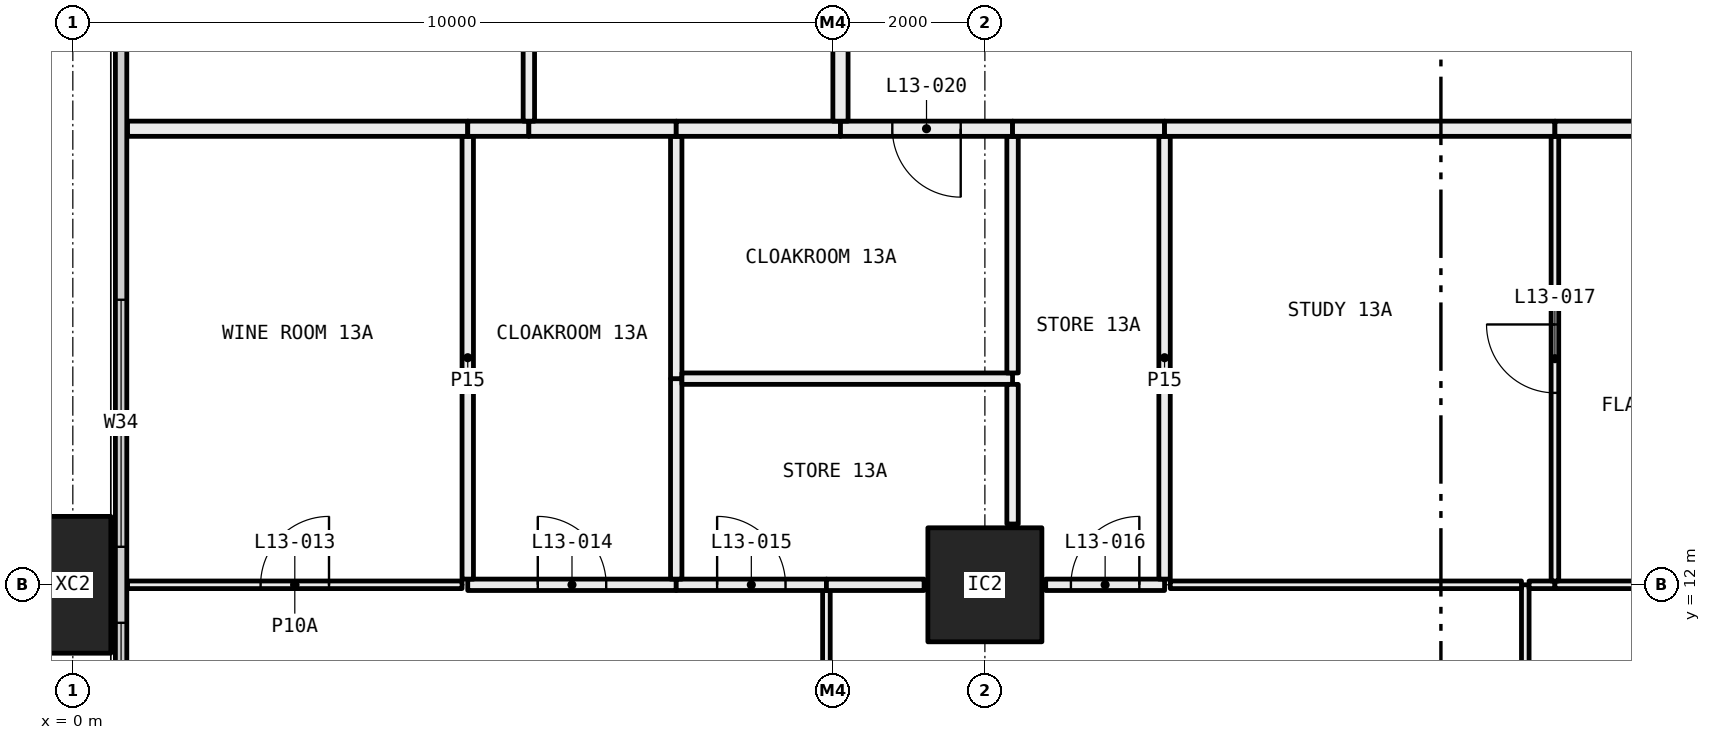
"""IFC4 building model, lengths in metres.
Left out: names, types, materials, properties, quantities, classifications, styles, units other than length and angle.
Written with IfcOpenShell. Run it as: python <this file> out.ifc"""

import sys

from ifc_helpers import new_model, si_unit, direction, frame, frame_2d, origin, origin_2d, place, context, subcontext, project, spatial, rectangle, hollow_rectangle, extrude, element, fill, save


model = new_model("IFC4")
c1 = context("Model", 3, precision=1e-05, world=origin(), true_north=direction((0.0, 1.0)))
c2 = subcontext(c1, "Body", "Model", "MODEL_VIEW")
j1 = project(units=[si_unit("LENGTHUNIT", "METRE"), si_unit("PLANEANGLEUNIT", "RADIAN")], contexts=[c1])
p1 = place(None, origin())
s1 = spatial("IfcSite", under=j1, at=p1, CompositionType="ELEMENT")
p2 = place(p1, origin())
s2 = spatial("IfcBuilding", under=s1, at=p2, CompositionType="ELEMENT")
p3 = place(p2, frame((0.0, 0.0, 57.6)))
s3 = spatial("IfcBuildingStorey", under=s2, at=p3, CompositionType="ELEMENT", Elevation=57.6)
p4 = place(p3, frame((0.0, 12.0, -0.4), z_axis=(0.0, 0.0, 1.0), x_axis=(0.0, 1.0, 0.0)))
e1 = element("IfcColumn", 1, at=p4, inside=s3, PredefinedType="COLUMN", context=c2, shape_type="SweptSolid", body=[
    extrude(hollow_rectangle(XDim=1.8, YDim=1.0, WallThickness=0.07, at=origin_2d()), origin(), (0.0, 0.0, 1.0), 3.45),
])
p5 = place(p3, frame((12.0, 12.0, 0.0), z_axis=(0.0, 0.0, 1.0), x_axis=(1.0, 0.0, 0.0)))
e2 = element("IfcColumn", 2, at=p5, inside=s3, PredefinedType="COLUMN", context=c2, shape_type="SweptSolid", body=[
    extrude(hollow_rectangle(XDim=1.5, YDim=1.5, WallThickness=0.065, at=origin_2d()), origin(), (0.0, 0.0, 1.0), 3.05),
])
p6 = place(p3, frame((0.635, 6.71, 0.0), z_axis=(0.0, 0.0, 1.0), x_axis=(0.0, 1.0, 0.0)))
e3 = element("IfcWall", 3, at=p6, inside=s3, PredefinedType="ELEMENTEDWALL", context=c2, shape_type="SweptSolid", body=[
    extrude(rectangle(XDim=34.58, YDim=0.15, at=frame_2d((17.29, 0.0))), origin(), (0.0, 0.0, 1.0), 3.05),
])
p7 = place(p6, frame((0.29, 0.0, 0.45)))
e4 = element("IfcOpeningElement", 4, at=p7, cuts=e3, PredefinedType="OPENING", context=c2, shape_type="SweptSolid", body=[
    extrude(rectangle(XDim=4.5, YDim=2.55, at=frame_2d((2.25, 1.275))), frame((0.0, 0.085, 0.0), z_axis=(0.0, -1.0, 0.0), x_axis=(1.0, 0.0, 0.0)), (0.0, 0.0, 1.0), 0.17),
])
p8 = place(p6, frame((5.79, 0.0, 0.45)))
e5 = element("IfcOpeningElement", 5, at=p8, cuts=e3, PredefinedType="OPENING", context=c2, shape_type="SweptSolid", body=[
    extrude(rectangle(XDim=3.25, YDim=2.55, at=frame_2d((1.625, 1.275))), frame((0.0, 0.085, 0.0), z_axis=(0.0, -1.0, 0.0), x_axis=(1.0, 0.0, 0.0)), (0.0, 0.0, 1.0), 0.17),
])
p9 = place(p6, frame((13.54, 0.0, 0.45)))
e6 = element("IfcOpeningElement", 6, at=p9, cuts=e3, PredefinedType="OPENING", context=c2, shape_type="SweptSolid", body=[
    extrude(rectangle(XDim=3.25, YDim=2.55, at=frame_2d((1.625, 1.275))), frame((0.0, 0.085, 0.0), z_axis=(0.0, -1.0, 0.0), x_axis=(1.0, 0.0, 0.0)), (0.0, 0.0, 1.0), 0.17),
])
p10 = place(p6, frame((17.79, 0.0, 0.45)))
e7 = element("IfcOpeningElement", 7, at=p10, cuts=e3, PredefinedType="OPENING", context=c2, shape_type="SweptSolid", body=[
    extrude(rectangle(XDim=3.25, YDim=2.55, at=frame_2d((1.625, 1.275))), frame((0.0, 0.085, 0.0), z_axis=(0.0, -1.0, 0.0), x_axis=(1.0, 0.0, 0.0)), (0.0, 0.0, 1.0), 0.17),
])
p11 = place(p6, frame((26.79, 0.0, 0.45)))
e8 = element("IfcOpeningElement", 8, at=p11, cuts=e3, PredefinedType="OPENING", context=c2, shape_type="SweptSolid", body=[
    extrude(rectangle(XDim=2.0, YDim=2.55, at=frame_2d((1.0, 1.275))), frame((0.0, 0.085, 0.0), z_axis=(0.0, -1.0, 0.0), x_axis=(1.0, 0.0, 0.0)), (0.0, 0.0, 1.0), 0.17),
])
p12 = place(p6, frame((29.79, 0.0, 0.45)))
e9 = element("IfcOpeningElement", 9, at=p12, cuts=e3, PredefinedType="OPENING", context=c2, shape_type="SweptSolid", body=[
    extrude(rectangle(XDim=4.5, YDim=2.55, at=frame_2d((2.25, 1.275))), frame((0.0, 0.085, 0.0), z_axis=(0.0, -1.0, 0.0), x_axis=(1.0, 0.0, 0.0)), (0.0, 0.0, 1.0), 0.17),
])
p13 = place(p3, frame((9.915, 6.05, 0.0), z_axis=(0.0, 0.0, 1.0), x_axis=(0.0, 1.0, 0.0)))
e10 = element("IfcWall", 10, at=p13, inside=s3, PredefinedType="PARTITIONING", context=c2, shape_type="SweptSolid", body=[
    extrude(rectangle(XDim=5.875, YDim=0.1, at=frame_2d((2.938, 0.0))), origin(), (0.0, 0.0, 1.0), 2.45),
])
p14 = place(p13, frame((2.488, 0.0, 0.0)))
e11 = element("IfcOpeningElement", 11, at=p14, cuts=e10, PredefinedType="OPENING", context=c2, shape_type="SweptSolid", body=[
    extrude(rectangle(XDim=0.9, YDim=2.1, at=frame_2d((0.45, 1.05))), frame((0.0, 0.06, 0.0), z_axis=(0.0, -1.0, 0.0), x_axis=(1.0, 0.0, 0.0)), (0.0, 0.0, 1.0), 0.12),
])
p15 = place(p3, frame((5.121, 12.0, 0.0), z_axis=(0.0, 0.0, 1.0), x_axis=(-1.0, 0.0, 0.0)))
e12 = element("IfcWall", 12, at=p15, inside=s3, PredefinedType="PARTITIONING", context=c2, shape_type="SweptSolid", body=[
    extrude(rectangle(XDim=4.401, YDim=0.1, at=frame_2d((2.201, 0.0))), origin(), (0.0, 0.0, 1.0), 2.45),
])
p16 = place(p15, frame((1.75, 0.0, 0.0)))
e13 = element("IfcOpeningElement", 13, at=p16, cuts=e12, PredefinedType="OPENING", context=c2, shape_type="SweptSolid", body=[
    extrude(rectangle(XDim=0.9, YDim=2.1, at=frame_2d((0.45, 1.05))), frame((0.0, 0.06, 0.0), z_axis=(0.0, -1.0, 0.0), x_axis=(1.0, 0.0, 0.0)), (0.0, 0.0, 1.0), 0.12),
])
p17 = place(p3, frame((7.939, 12.0, 0.0), z_axis=(0.0, 0.0, 1.0), x_axis=(-1.0, 0.0, 0.0)))
e14 = element("IfcWall", 14, at=p17, inside=s3, PredefinedType="PARTITIONING", context=c2, shape_type="SweptSolid", body=[
    extrude(rectangle(XDim=2.743, YDim=0.15, at=frame_2d((1.372, 0.0))), origin(), (0.0, 0.0, 1.0), 2.45),
])
p18 = place(p17, frame((0.921, 0.0, 0.0)))
e15 = element("IfcOpeningElement", 15, at=p18, cuts=e14, PredefinedType="OPENING", context=c2, shape_type="SweptSolid", body=[
    extrude(rectangle(XDim=0.9, YDim=2.1, at=frame_2d((0.45, 1.05))), frame((0.0, 0.085, 0.0), z_axis=(0.0, -1.0, 0.0), x_axis=(1.0, 0.0, 0.0)), (0.0, 0.0, 1.0), 0.17),
])
p19 = place(p3, frame((9.915, 12.0, 0.0), z_axis=(0.0, 0.0, 1.0), x_axis=(-1.0, 0.0, 0.0)))
e16 = element("IfcWall", 16, at=p19, inside=s3, PredefinedType="PARTITIONING", context=c2, shape_type="SweptSolid", body=[
    extrude(rectangle(XDim=1.976, YDim=0.15, at=frame_2d((0.988, 0.0))), origin(), (0.0, 0.0, 1.0), 2.45),
])
p20 = place(p19, frame((0.538, 0.0, 0.0)))
e17 = element("IfcOpeningElement", 17, at=p20, cuts=e16, PredefinedType="OPENING", context=c2, shape_type="SweptSolid", body=[
    extrude(rectangle(XDim=0.9, YDim=2.1, at=frame_2d((0.45, 1.05))), frame((0.0, 0.085, 0.0), z_axis=(0.0, -1.0, 0.0), x_axis=(1.0, 0.0, 0.0)), (0.0, 0.0, 1.0), 0.17),
])
p21 = place(p3, frame((19.11, 6.05, 0.0), z_axis=(0.0, 0.0, 1.0), x_axis=(0.0, 1.0, 0.0)))
e18 = element("IfcWall", 18, at=p21, inside=s3, PredefinedType="PARTITIONING", context=c2, shape_type="SweptSolid", body=[
    extrude(rectangle(XDim=5.95, YDim=0.1, at=frame_2d((2.975, 0.0))), origin(), (0.0, 0.0, 1.0), 2.45),
])
p22 = place(p21, frame((2.525, 0.0, 0.0)))
e19 = element("IfcOpeningElement", 19, at=p22, cuts=e18, PredefinedType="OPENING", context=c2, shape_type="SweptSolid", body=[
    extrude(rectangle(XDim=0.9, YDim=2.1, at=frame_2d((0.45, 1.05))), frame((0.0, 0.06, 0.0), z_axis=(0.0, -1.0, 0.0), x_axis=(1.0, 0.0, 0.0)), (0.0, 0.0, 1.0), 0.12),
])
p23 = place(p3, frame((11.2, 12.0, 0.0), z_axis=(0.0, 0.0, 1.0), x_axis=(-1.0, 0.0, 0.0)))
e20 = element("IfcWall", 20, at=p23, inside=s3, PredefinedType="PARTITIONING", context=c2, shape_type="SweptSolid", body=[
    extrude(rectangle(XDim=1.285, YDim=0.15, at=frame_2d((0.643, 0.0))), origin(), (0.0, 0.0, 1.0), 2.45),
])
p24 = place(p3, frame((14.364, 12.0, 0.0), z_axis=(0.0, 0.0, 1.0), x_axis=(-1.0, 0.0, 0.0)))
e21 = element("IfcWall", 21, at=p24, inside=s3, PredefinedType="PARTITIONING", context=c2, shape_type="SweptSolid", body=[
    extrude(rectangle(XDim=1.564, YDim=0.15, at=frame_2d((0.782, 0.0))), origin(), (0.0, 0.0, 1.0), 2.45),
])
p25 = place(p24, frame((0.332, 0.0, 0.0)))
e22 = element("IfcOpeningElement", 22, at=p25, cuts=e21, PredefinedType="OPENING", context=c2, shape_type="SweptSolid", body=[
    extrude(rectangle(XDim=0.9, YDim=2.1, at=frame_2d((0.45, 1.05))), frame((0.0, 0.085, 0.0), z_axis=(0.0, -1.0, 0.0), x_axis=(1.0, 0.0, 0.0)), (0.0, 0.0, 1.0), 0.17),
])
p26 = place(p3, frame((19.06, 12.0, 0.0), z_axis=(0.0, 0.0, 1.0), x_axis=(-1.0, 0.0, 0.0)))
e23 = element("IfcWall", 23, at=p26, inside=s3, PredefinedType="PARTITIONING", context=c2, shape_type="SweptSolid", body=[
    extrude(rectangle(XDim=4.621, YDim=0.1, at=frame_2d((2.311, 0.0))), origin(), (0.0, 0.0, 1.0), 2.45),
])
p27 = place(p3, frame((19.5, 12.0, 0.0), z_axis=(0.0, 0.0, 1.0), x_axis=(-1.0, 0.0, 0.0)))
e24 = element("IfcWall", 24, at=p27, inside=s3, PredefinedType="PARTITIONING", context=c2, shape_type="SweptSolid", body=[
    extrude(rectangle(XDim=0.34, YDim=0.1, at=frame_2d((0.17, 0.0))), origin(), (0.0, 0.0, 1.0), 2.45),
])
p28 = place(p3, frame((23.2, 12.0, 0.0), z_axis=(0.0, 0.0, 1.0), x_axis=(-1.0, 0.0, 0.0)))
e25 = element("IfcWall", 25, at=p28, inside=s3, PredefinedType="PARTITIONING", context=c2, shape_type="SweptSolid", body=[
    extrude(rectangle(XDim=3.7, YDim=0.1, at=frame_2d((1.85, 0.0))), origin(), (0.0, 0.0, 1.0), 2.45),
])
p29 = place(p28, frame((1.4, 0.0, 0.0)))
e26 = element("IfcOpeningElement", 26, at=p29, cuts=e25, PredefinedType="OPENING", context=c2, shape_type="SweptSolid", body=[
    extrude(rectangle(XDim=0.9, YDim=2.1, at=frame_2d((0.45, 1.05))), frame((0.0, 0.06, 0.0), z_axis=(0.0, -1.0, 0.0), x_axis=(1.0, 0.0, 0.0)), (0.0, 0.0, 1.0), 0.12),
])
p30 = place(p3, frame((5.196, 12.075, 0.0), z_axis=(0.0, 0.0, 1.0), x_axis=(0.0, 1.0, 0.0)))
e27 = element("IfcWall", 27, at=p30, inside=s3, PredefinedType="PARTITIONING", context=c2, shape_type="SweptSolid", body=[
    extrude(rectangle(XDim=5.825, YDim=0.15, at=frame_2d((2.913, 0.0))), origin(), (0.0, 0.0, 1.0), 2.45),
])
p31 = place(p3, frame((5.196, 18.0, 0.0), z_axis=(0.0, 0.0, 1.0), x_axis=(-1.0, 0.0, 0.0)))
e28 = element("IfcWall", 28, at=p31, inside=s3, PredefinedType="PARTITIONING", context=c2, shape_type="SweptSolid", body=[
    extrude(rectangle(XDim=4.476, YDim=0.2, at=frame_2d((2.238, 0.0))), origin(), (0.0, 0.0, 1.0), 3.05),
])
p32 = place(p3, frame((7.939, 12.075, 0.0), z_axis=(0.0, 0.0, 1.0), x_axis=(0.0, 1.0, 0.0)))
e29 = element("IfcWall", 29, at=p32, inside=s3, PredefinedType="PARTITIONING", context=c2, shape_type="SweptSolid", body=[
    extrude(rectangle(XDim=2.637, YDim=0.15, at=frame_2d((1.318, 0.0))), origin(), (0.0, 0.0, 1.0), 2.45),
])
p33 = place(p3, frame((7.939, 14.712, 0.0), z_axis=(0.0, 0.0, 1.0), x_axis=(0.0, 1.0, 0.0)))
e30 = element("IfcWall", 30, at=p33, inside=s3, PredefinedType="PARTITIONING", context=c2, shape_type="SweptSolid", body=[
    extrude(rectangle(XDim=3.188, YDim=0.15, at=frame_2d((1.594, 0.0))), origin(), (0.0, 0.0, 1.0), 3.05),
])
p34 = place(p3, frame((6.0, 18.0, 0.0), z_axis=(0.0, 0.0, 1.0), x_axis=(-1.0, 0.0, 0.0)))
e31 = element("IfcWall", 31, at=p34, inside=s3, PredefinedType="PARTITIONING", context=c2, shape_type="SweptSolid", body=[
    extrude(rectangle(XDim=0.804, YDim=0.2, at=frame_2d((0.402, 0.0))), origin(), (0.0, 0.0, 1.0), 3.05),
])
p35 = place(p3, frame((7.939, 18.0, 0.0), z_axis=(0.0, 0.0, 1.0), x_axis=(-1.0, 0.0, 0.0)))
e32 = element("IfcWall", 32, at=p35, inside=s3, PredefinedType="PARTITIONING", context=c2, shape_type="SweptSolid", body=[
    extrude(rectangle(XDim=1.939, YDim=0.2, at=frame_2d((0.969, 0.0))), origin(), (0.0, 0.0, 1.0), 3.05),
])
p36 = place(p3, frame((12.364, 14.712, 0.0), z_axis=(0.0, 0.0, 1.0), x_axis=(-1.0, 0.0, 0.0)))
e33 = element("IfcWall", 33, at=p36, inside=s3, PredefinedType="PARTITIONING", context=c2, shape_type="SweptSolid", body=[
    extrude(rectangle(XDim=4.35, YDim=0.15, at=frame_2d((2.175, 0.0))), origin(), (0.0, 0.0, 1.0), 3.05),
])
p37 = place(p3, frame((12.364, 12.8, 0.0), z_axis=(0.0, 0.0, 1.0), x_axis=(0.0, 1.0, 0.0)))
e34 = element("IfcWall", 34, at=p37, inside=s3, PredefinedType="PARTITIONING", context=c2, shape_type="SweptSolid", body=[
    extrude(rectangle(XDim=1.837, YDim=0.15, at=frame_2d((0.918, 0.0))), origin(), (0.0, 0.0, 1.0), 3.05),
])
p38 = place(p3, frame((12.364, 14.787, 0.0), z_axis=(0.0, 0.0, 1.0), x_axis=(0.0, 1.0, 0.0)))
e35 = element("IfcWall", 35, at=p38, inside=s3, PredefinedType="PARTITIONING", context=c2, shape_type="SweptSolid", body=[
    extrude(rectangle(XDim=3.113, YDim=0.15, at=frame_2d((1.556, 0.0))), origin(), (0.0, 0.0, 1.0), 3.05),
])
p39 = place(p3, frame((10.1, 18.0, 0.0), z_axis=(0.0, 0.0, 1.0), x_axis=(-1.0, 0.0, 0.0)))
e36 = element("IfcWall", 36, at=p39, inside=s3, PredefinedType="PARTITIONING", context=c2, shape_type="SweptSolid", body=[
    extrude(rectangle(XDim=2.161, YDim=0.2, at=frame_2d((1.081, 0.0))), origin(), (0.0, 0.0, 1.0), 3.05),
])
p40 = place(p3, frame((12.364, 18.0, 0.0), z_axis=(0.0, 0.0, 1.0), x_axis=(-1.0, 0.0, 0.0)))
e37 = element("IfcWall", 37, at=p40, inside=s3, PredefinedType="PARTITIONING", context=c2, shape_type="SweptSolid", body=[
    extrude(rectangle(XDim=2.264, YDim=0.2, at=frame_2d((1.132, 0.0))), origin(), (0.0, 0.0, 1.0), 3.05),
])
p41 = place(p40, frame((0.682, 0.0, 0.0)))
e38 = element("IfcOpeningElement", 38, at=p41, cuts=e37, PredefinedType="OPENING", context=c2, shape_type="SweptSolid", body=[
    extrude(rectangle(XDim=0.9, YDim=2.1, at=frame_2d((0.45, 1.05))), frame((0.0, 0.11, 0.0), z_axis=(0.0, -1.0, 0.0), x_axis=(1.0, 0.0, 0.0)), (0.0, 0.0, 1.0), 0.22),
])
p42 = place(p3, frame((14.364, 12.075, 0.0), z_axis=(0.0, 0.0, 1.0), x_axis=(0.0, 1.0, 0.0)))
e39 = element("IfcWall", 39, at=p42, inside=s3, PredefinedType="PARTITIONING", context=c2, shape_type="SweptSolid", body=[
    extrude(rectangle(XDim=5.825, YDim=0.15, at=frame_2d((2.913, 0.0))), origin(), (0.0, 0.0, 1.0), 2.45),
])
p43 = place(p3, frame((14.364, 18.0, 0.0), z_axis=(0.0, 0.0, 1.0), x_axis=(-1.0, 0.0, 0.0)))
e40 = element("IfcWall", 40, at=p43, inside=s3, PredefinedType="PARTITIONING", context=c2, shape_type="SweptSolid", body=[
    extrude(rectangle(XDim=2.0, YDim=0.2, at=frame_2d((1.0, 0.0))), origin(), (0.0, 0.0, 1.0), 3.05),
])
p44 = place(p3, frame((19.5, 12.05, 0.0), z_axis=(0.0, 0.0, 1.0), x_axis=(0.0, 1.0, 0.0)))
e41 = element("IfcWall", 41, at=p44, inside=s3, PredefinedType="PARTITIONING", context=c2, shape_type="SweptSolid", body=[
    extrude(rectangle(XDim=5.85, YDim=0.1, at=frame_2d((2.925, 0.0))), origin(), (0.0, 0.0, 1.0), 2.45),
])
p45 = place(p44, frame((2.475, 0.0, 0.0)))
e42 = element("IfcOpeningElement", 42, at=p45, cuts=e41, PredefinedType="OPENING", context=c2, shape_type="SweptSolid", body=[
    extrude(rectangle(XDim=0.9, YDim=2.1, at=frame_2d((0.45, 1.05))), frame((0.0, 0.06, 0.0), z_axis=(0.0, -1.0, 0.0), x_axis=(1.0, 0.0, 0.0)), (0.0, 0.0, 1.0), 0.12),
])
p46 = place(p3, frame((19.5, 18.0, 0.0), z_axis=(0.0, 0.0, 1.0), x_axis=(-1.0, 0.0, 0.0)))
e43 = element("IfcWall", 43, at=p46, inside=s3, PredefinedType="PARTITIONING", context=c2, shape_type="SweptSolid", body=[
    extrude(rectangle(XDim=5.136, YDim=0.2, at=frame_2d((2.568, 0.0))), origin(), (0.0, 0.0, 1.0), 3.05),
])
p47 = place(p3, frame((24.0, 18.0, 0.0), z_axis=(0.0, 0.0, 1.0), x_axis=(-1.0, 0.0, 0.0)))
e44 = element("IfcWall", 44, at=p47, inside=s3, PredefinedType="PARTITIONING", context=c2, shape_type="SweptSolid", body=[
    extrude(rectangle(XDim=4.5, YDim=0.2, at=frame_2d((2.25, 0.0))), origin(), (0.0, 0.0, 1.0), 3.05),
])
p48 = place(p47, frame((1.75, 0.0, 0.0)))
e45 = element("IfcOpeningElement", 45, at=p48, cuts=e44, PredefinedType="OPENING", context=c2, shape_type="SweptSolid", body=[
    extrude(rectangle(XDim=1.0, YDim=2.1, at=frame_2d((0.5, 1.05))), frame((0.0, 0.11, 0.0), z_axis=(0.0, -1.0, 0.0), x_axis=(1.0, 0.0, 0.0)), (0.0, 0.0, 1.0), 0.22),
])
p49 = place(p3, frame((6.0, 18.1, 0.0), z_axis=(0.0, 0.0, 1.0), x_axis=(0.0, 1.0, 0.0)))
e46 = element("IfcWall", 46, at=p49, inside=s3, PredefinedType="PARTITIONING", context=c2, shape_type="SweptSolid", body=[
    extrude(rectangle(XDim=4.4, YDim=0.15, at=frame_2d((2.2, 0.0))), origin(), (0.0, 0.0, 1.0), 3.05),
])
p50 = place(p49, frame((1.75, 0.0, 0.0)))
e47 = element("IfcOpeningElement", 47, at=p50, cuts=e46, PredefinedType="OPENING", context=c2, shape_type="SweptSolid", body=[
    extrude(rectangle(XDim=0.9, YDim=2.1, at=frame_2d((0.45, 1.05))), frame((0.0, 0.085, 0.0), z_axis=(0.0, -1.0, 0.0), x_axis=(1.0, 0.0, 0.0)), (0.0, 0.0, 1.0), 0.17),
])
p51 = place(p3, frame((10.1, 18.1, 0.0), z_axis=(0.0, 0.0, 1.0), x_axis=(0.0, 1.0, 0.0)))
e48 = element("IfcWall", 48, at=p51, inside=s3, PredefinedType="PARTITIONING", context=c2, shape_type="SweptSolid", body=[
    extrude(rectangle(XDim=4.4, YDim=0.2, at=frame_2d((2.2, 0.0))), origin(), (0.0, 0.0, 1.0), 3.05),
])
p52 = place(p7, origin())
e49 = element("IfcWindow", 49, at=p52, inside=s3, PartitioningType="SINGLE_PANEL", PredefinedType="WINDOW", context=c2, shape_type="SweptSolid", body=[
    extrude(rectangle(XDim=4.5, YDim=2.55, at=frame_2d((2.25, 1.275))), frame((0.0, 0.03, 0.0), z_axis=(0.0, -1.0, 0.0), x_axis=(1.0, 0.0, 0.0)), (0.0, 0.0, 1.0), 0.06),
])
fill(e4, e49)
p53 = place(p8, origin())
e50 = element("IfcWindow", 50, at=p53, inside=s3, PartitioningType="SINGLE_PANEL", PredefinedType="WINDOW", context=c2, shape_type="SweptSolid", body=[
    extrude(rectangle(XDim=3.25, YDim=2.55, at=frame_2d((1.625, 1.275))), frame((0.0, 0.03, 0.0), z_axis=(0.0, -1.0, 0.0), x_axis=(1.0, 0.0, 0.0)), (0.0, 0.0, 1.0), 0.06),
])
fill(e5, e50)
p54 = place(p16, frame((0.9, 0.0, 0.0), x_axis=(-1.0, 0.0, 0.0)))
e51 = element("IfcDoor", 51, at=p54, inside=s3, OperationType="SINGLE_SWING_LEFT", PredefinedType="DOOR", context=c2, shape_type="SweptSolid", body=[
    extrude(rectangle(XDim=0.9, YDim=2.1, at=frame_2d((0.45, 1.05))), frame((0.0, 0.025, 0.0), z_axis=(0.0, -1.0, 0.0), x_axis=(1.0, 0.0, 0.0)), (0.0, 0.0, 1.0), 0.05),
])
fill(e13, e51)
p55 = place(p18, frame((0.9, 0.0, 0.0), x_axis=(-1.0, 0.0, 0.0)))
e52 = element("IfcDoor", 52, at=p55, inside=s3, OperationType="SINGLE_SWING_RIGHT", PredefinedType="DOOR", context=c2, shape_type="SweptSolid", body=[
    extrude(rectangle(XDim=0.9, YDim=2.1, at=frame_2d((0.45, 1.05))), frame((0.0, 0.025, 0.0), z_axis=(0.0, -1.0, 0.0), x_axis=(1.0, 0.0, 0.0)), (0.0, 0.0, 1.0), 0.05),
])
fill(e15, e52)
p56 = place(p20, frame((0.9, 0.0, 0.0), x_axis=(-1.0, 0.0, 0.0)))
e53 = element("IfcDoor", 53, at=p56, inside=s3, OperationType="SINGLE_SWING_RIGHT", PredefinedType="DOOR", context=c2, shape_type="SweptSolid", body=[
    extrude(rectangle(XDim=0.9, YDim=2.1, at=frame_2d((0.45, 1.05))), frame((0.0, 0.025, 0.0), z_axis=(0.0, -1.0, 0.0), x_axis=(1.0, 0.0, 0.0)), (0.0, 0.0, 1.0), 0.05),
])
fill(e17, e53)
p57 = place(p25, frame((0.9, 0.0, 0.0), x_axis=(-1.0, 0.0, 0.0)))
e54 = element("IfcDoor", 54, at=p57, inside=s3, OperationType="SINGLE_SWING_LEFT", PredefinedType="DOOR", context=c2, shape_type="SweptSolid", body=[
    extrude(rectangle(XDim=0.9, YDim=2.1, at=frame_2d((0.45, 1.05))), frame((0.0, 0.025, 0.0), z_axis=(0.0, -1.0, 0.0), x_axis=(1.0, 0.0, 0.0)), (0.0, 0.0, 1.0), 0.05),
])
fill(e22, e54)
p58 = place(p45, origin())
e55 = element("IfcDoor", 55, at=p58, inside=s3, OperationType="SINGLE_SWING_LEFT", PredefinedType="DOOR", context=c2, shape_type="SweptSolid", body=[
    extrude(rectangle(XDim=0.9, YDim=2.1, at=frame_2d((0.45, 1.05))), frame((0.0, 0.025, 0.0), z_axis=(0.0, -1.0, 0.0), x_axis=(1.0, 0.0, 0.0)), (0.0, 0.0, 1.0), 0.05),
])
fill(e42, e55)
p59 = place(p41, origin())
e56 = element("IfcDoor", 56, at=p59, inside=s3, OperationType="SINGLE_SWING_RIGHT", PredefinedType="DOOR", context=c2, shape_type="SweptSolid", body=[
    extrude(rectangle(XDim=0.9, YDim=2.1, at=frame_2d((0.45, 1.05))), frame((0.0, 0.025, 0.0), z_axis=(0.0, -1.0, 0.0), x_axis=(1.0, 0.0, 0.0)), (0.0, 0.0, 1.0), 0.05),
])
fill(e38, e56)
save(model, sys.argv[1])
